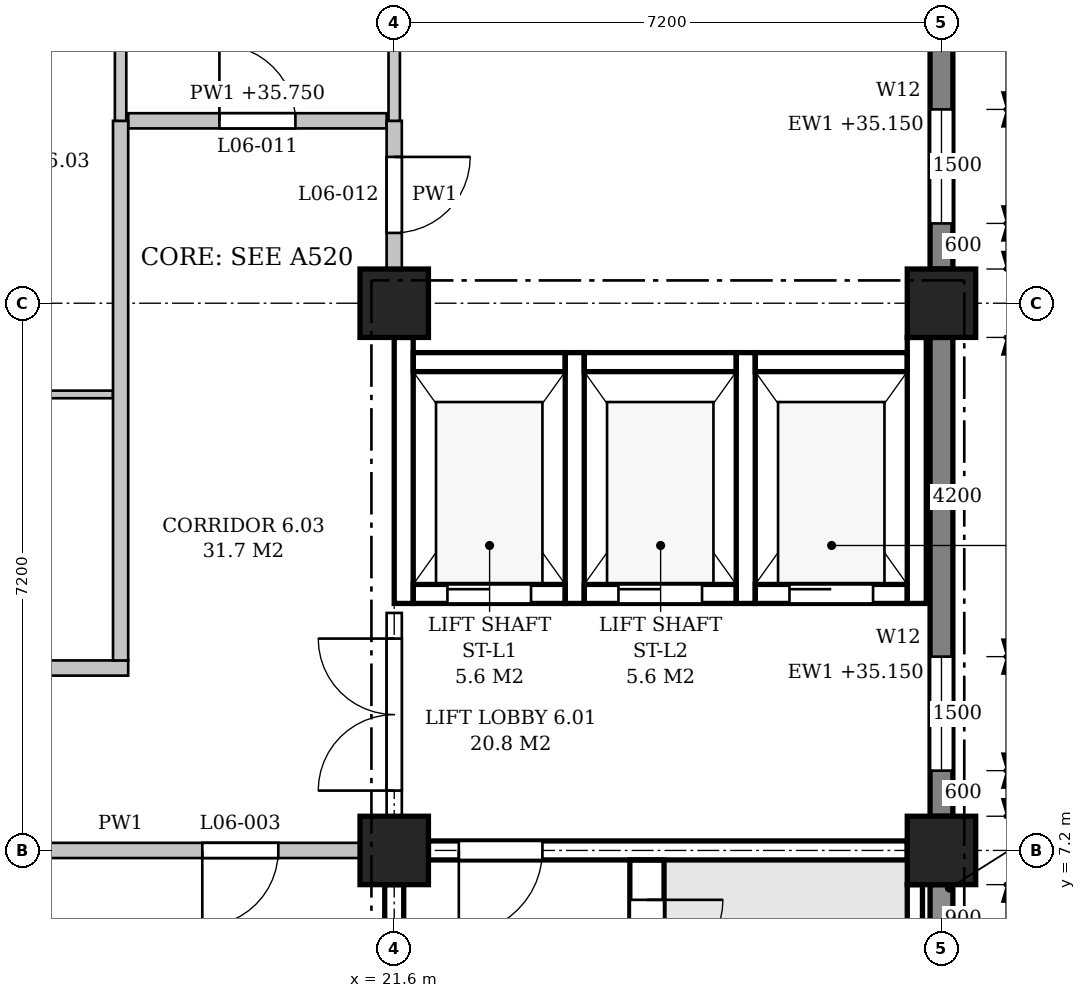
"""IFC4 building model, lengths in metres.
Left out: names, types, materials, properties, quantities, classifications, styles, units other than length and angle.
Written with IfcOpenShell. Run it as: python <this file> out.ifc"""

import sys

from ifc_helpers import new_model, si_unit, direction, frame, frame_2d, origin, origin_2d, place, context, subcontext, project, spatial, polyline, rectangle, outline, extrude, element, fill, save


model = new_model("IFC4")
c1 = context("Model", 3, precision=1e-05, world=origin(), true_north=direction((0.0, 1.0)))
c2 = subcontext(c1, "Body", "Model", "MODEL_VIEW")
j1 = project(units=[si_unit("LENGTHUNIT", "METRE"), si_unit("PLANEANGLEUNIT", "RADIAN")], contexts=[c1])
p1 = place(None, origin())
s1 = spatial("IfcSite", under=j1, at=p1, CompositionType="ELEMENT")
p2 = place(p1, origin())
s2 = spatial("IfcBuilding", under=s1, at=p2, CompositionType="ELEMENT")
p3 = place(p2, frame((0.0, 0.0, 31.2)))
s3 = spatial("IfcBuildingStorey", under=s2, at=p3, CompositionType="ELEMENT", Elevation=31.2)
for number, where, z_axis, x_axis in (
    (1, (21.6, 7.2, 0.0), (0.0, 0.0, 1.0), (1.0, 0.0, 0.0)),
    (2, (21.6, 14.4, 0.0), (0.0, 0.0, 1.0), (1.0, 0.0, 0.0)),
    (3, (28.8, 7.2, 0.0), (0.0, 0.0, 1.0), (1.0, 0.0, 0.0)),
    (4, (28.8, 14.4, 0.0), (0.0, 0.0, 1.0), (1.0, 0.0, 0.0)),
):
    element("IfcColumn", number, at=place(p3, frame(where, z_axis=z_axis, x_axis=x_axis)), inside=s3, PredefinedType="COLUMN", context=c2, shape_type="SweptSolid", body=[
        extrude(rectangle(XDim=0.9, YDim=0.9, at=origin_2d()), origin(), (0.0, 0.0, 1.0), 4.8),
    ])
p4 = place(p3, frame((28.8, 0.45, 0.0), z_axis=(0.0, 0.0, 1.0), x_axis=(0.0, 1.0, 0.0)))
e5 = element("IfcWall", 5, at=p4, inside=s3, PredefinedType="STANDARD", context=c2, shape_type="SweptSolid", body=[
    extrude(rectangle(XDim=6.3, YDim=0.3, at=frame_2d((3.15, 0.0))), origin(), (0.0, 0.0, 1.0), 3.95),
])
p5 = place(p4, frame((0.9, 0.0, 0.9)))
e6 = element("IfcOpeningElement", 6, at=p5, cuts=e5, PredefinedType="OPENING", context=c2, shape_type="SweptSolid", body=[
    extrude(outline(polyline([(0.0, 0.0), (0.9, 0.0), (0.9, 2.05), (0.45, 2.5), (0.0, 2.05), (0.0, 0.0)])), frame((0.0, 0.16, 0.0), z_axis=(0.0, -1.0, 0.0), x_axis=(1.0, 0.0, 0.0)), (0.0, 0.0, 1.0), 0.32),
])
p6 = place(p4, frame((4.5, 0.0, 0.9)))
e7 = element("IfcOpeningElement", 7, at=p6, cuts=e5, PredefinedType="OPENING", context=c2, shape_type="SweptSolid", body=[
    extrude(outline(polyline([(0.0, 0.0), (0.9, 0.0), (0.9, 2.05), (0.45, 2.5), (0.0, 2.05), (0.0, 0.0)])), frame((0.0, 0.16, 0.0), z_axis=(0.0, -1.0, 0.0), x_axis=(1.0, 0.0, 0.0)), (0.0, 0.0, 1.0), 0.32),
])
p7 = place(p3, frame((28.8, 7.65, 0.0), z_axis=(0.0, 0.0, 1.0), x_axis=(0.0, 1.0, 0.0)))
e8 = element("IfcWall", 8, at=p7, inside=s3, PredefinedType="STANDARD", context=c2, shape_type="SweptSolid", body=[
    extrude(rectangle(XDim=6.3, YDim=0.3, at=frame_2d((3.15, 0.0))), origin(), (0.0, 0.0, 1.0), 3.95),
])
p8 = place(p7, frame((0.6, 0.0, 0.9)))
e9 = element("IfcOpeningElement", 9, at=p8, cuts=e8, PredefinedType="OPENING", context=c2, shape_type="SweptSolid", body=[
    extrude(outline(polyline([(0.0, 0.0), (1.5, 0.0), (1.5, 1.75), (0.75, 2.5), (0.0, 1.75), (0.0, 0.0)])), frame((0.0, 0.16, 0.0), z_axis=(0.0, -1.0, 0.0), x_axis=(1.0, 0.0, 0.0)), (0.0, 0.0, 1.0), 0.32),
])
p9 = place(p3, frame((28.8, 14.85, 0.0), z_axis=(0.0, 0.0, 1.0), x_axis=(0.0, 1.0, 0.0)))
e10 = element("IfcWall", 10, at=p9, inside=s3, PredefinedType="STANDARD", context=c2, shape_type="SweptSolid", body=[
    extrude(rectangle(XDim=6.3, YDim=0.3, at=frame_2d((3.15, 0.0))), origin(), (0.0, 0.0, 1.0), 3.95),
])
p10 = place(p9, frame((0.6, 0.0, 0.9)))
e11 = element("IfcOpeningElement", 11, at=p10, cuts=e10, PredefinedType="OPENING", context=c2, shape_type="SweptSolid", body=[
    extrude(outline(polyline([(0.0, 0.0), (1.5, 0.0), (1.5, 1.75), (0.75, 2.5), (0.0, 1.75), (0.0, 0.0)])), frame((0.0, 0.16, 0.0), z_axis=(0.0, -1.0, 0.0), x_axis=(1.0, 0.0, 0.0)), (0.0, 0.0, 1.0), 0.32),
])
p11 = place(p9, frame((4.2, 0.0, 0.9)))
e12 = element("IfcOpeningElement", 12, at=p11, cuts=e10, PredefinedType="OPENING", context=c2, shape_type="SweptSolid", body=[
    extrude(outline(polyline([(0.0, 0.0), (1.5, 0.0), (1.5, 1.75), (0.75, 2.5), (0.0, 1.75), (0.0, 0.0)])), frame((0.0, 0.16, 0.0), z_axis=(0.0, -1.0, 0.0), x_axis=(1.0, 0.0, 0.0)), (0.0, 0.0, 1.0), 0.32),
])
p12 = place(p3, frame((22.05, 7.2, 0.0), z_axis=(0.0, 0.0, 1.0), x_axis=(1.0, 0.0, 0.0)))
e13 = element("IfcWall", 13, at=p12, inside=s3, PredefinedType="SHEAR", context=c2, shape_type="SweptSolid", body=[
    extrude(rectangle(XDim=6.3, YDim=0.25, at=frame_2d((3.15, 0.0))), origin(), (0.0, 0.0, 1.0), 3.8),
])
p13 = place(p12, frame((0.4, 0.0, 0.0)))
e14 = element("IfcOpeningElement", 14, at=p13, cuts=e13, PredefinedType="OPENING", context=c2, shape_type="SweptSolid", body=[
    extrude(rectangle(XDim=1.1, YDim=2.1, at=frame_2d((0.55, 1.05))), frame((0.0, 0.135, 0.0), z_axis=(0.0, -1.0, 0.0), x_axis=(1.0, 0.0, 0.0)), (0.0, 0.0, 1.0), 0.27),
])
p14 = place(p3, frame((21.6, 0.45, 0.0), z_axis=(0.0, 0.0, 1.0), x_axis=(0.0, 1.0, 0.0)))
e15 = element("IfcWall", 15, at=p14, inside=s3, PredefinedType="SHEAR", context=c2, shape_type="SweptSolid", body=[
    extrude(rectangle(XDim=6.3, YDim=0.25, at=frame_2d((3.15, 0.0))), origin(), (0.0, 0.0, 1.0), 3.8),
])
p15 = place(p3, frame((28.45, 5.85, -0.25), z_axis=(0.0, 0.0, 1.0), x_axis=(0.0, 1.0, 0.0)))
e16 = element("IfcWall", 16, at=p15, inside=s3, PredefinedType="SHEAR", context=c2, shape_type="SweptSolid", body=[
    extrude(rectangle(XDim=0.9, YDim=0.2, at=frame_2d((0.45, 0.0))), origin(), (0.0, 0.0, 1.0), 4.8),
])
p16 = place(p3, frame((24.925, 0.225, 0.0), z_axis=(0.0, 0.0, 1.0), x_axis=(0.0, 1.0, 0.0)))
e17 = element("IfcWall", 17, at=p16, inside=s3, PredefinedType="SHEAR", context=c2, shape_type="SweptSolid", body=[
    extrude(rectangle(XDim=6.85, YDim=0.45, at=frame_2d((3.425, 0.0))), origin(), (0.0, 0.0, 1.0), 4.55),
])
p17 = place(p16, frame((5.325, 0.0, 0.0)))
e18 = element("IfcOpeningElement", 18, at=p17, cuts=e17, PredefinedType="OPENING", context=c2, shape_type="SweptSolid", body=[
    extrude(rectangle(XDim=1.0, YDim=2.1, at=frame_2d((0.5, 1.05))), frame((0.0, 0.235, 0.0), z_axis=(0.0, -1.0, 0.0), x_axis=(1.0, 0.0, 0.0)), (0.0, 0.0, 1.0), 0.47),
])
p18 = place(p3, frame((21.725, 10.45, -0.25), z_axis=(0.0, 0.0, 1.0), x_axis=(0.0, 1.0, 0.0)))
e19 = element("IfcWall", 19, at=p18, inside=s3, PredefinedType="SHEAR", context=c2, shape_type="SweptSolid", body=[
    extrude(rectangle(XDim=3.5, YDim=0.25, at=frame_2d((1.75, 0.0))), origin(), (0.0, 0.0, 1.0), 4.05),
])
for number, where, z_axis, x_axis in (
    (20, (23.975, 10.45, -0.25), (0.0, 0.0, 1.0), (0.0, 1.0, 0.0)),
    (21, (26.225, 10.45, -0.25), (0.0, 0.0, 1.0), (0.0, 1.0, 0.0)),
):
    element("IfcWall", number, at=place(p3, frame(where, z_axis=z_axis, x_axis=x_axis)), inside=s3, PredefinedType="SHEAR", context=c2, shape_type="SweptSolid", body=[
        extrude(rectangle(XDim=3.3, YDim=0.25, at=frame_2d((1.65, 0.0))), origin(), (0.0, 0.0, 1.0), 4.8),
    ])
p19 = place(p3, frame((28.475, 10.45, -0.25), z_axis=(0.0, 0.0, 1.0), x_axis=(0.0, 1.0, 0.0)))
e22 = element("IfcWall", 22, at=p19, inside=s3, PredefinedType="SHEAR", context=c2, shape_type="SweptSolid", body=[
    extrude(rectangle(XDim=3.5, YDim=0.25, at=frame_2d((1.75, 0.0))), origin(), (0.0, 0.0, 1.0), 4.8),
])
p20 = place(p3, frame((21.85, 10.575, -0.25), z_axis=(0.0, 0.0, 1.0), x_axis=(1.0, 0.0, 0.0)))
e23 = element("IfcWall", 23, at=p20, inside=s3, PredefinedType="SHEAR", context=c2, shape_type="SweptSolid", body=[
    extrude(rectangle(XDim=2.0, YDim=0.25, at=frame_2d((1.0, 0.0))), origin(), (0.0, 0.0, 1.0), 4.8),
])
p21 = place(p20, frame((0.45, 0.0, 0.25)))
e24 = element("IfcOpeningElement", 24, at=p21, cuts=e23, PredefinedType="OPENING", context=c2, shape_type="SweptSolid", body=[
    extrude(rectangle(XDim=1.1, YDim=2.1, at=frame_2d((0.55, 1.05))), frame((0.0, 0.135, 0.0), z_axis=(0.0, -1.0, 0.0), x_axis=(1.0, 0.0, 0.0)), (0.0, 0.0, 1.0), 0.27),
])
p22 = place(p3, frame((21.85, 13.625, -0.25), z_axis=(0.0, 0.0, 1.0), x_axis=(1.0, 0.0, 0.0)))
e25 = element("IfcWall", 25, at=p22, inside=s3, PredefinedType="SHEAR", context=c2, shape_type="SweptSolid", body=[
    extrude(rectangle(XDim=2.0, YDim=0.25, at=frame_2d((1.0, 0.0))), origin(), (0.0, 0.0, 1.0), 4.8),
])
p23 = place(p3, frame((24.1, 10.575, -0.25), z_axis=(0.0, 0.0, 1.0), x_axis=(1.0, 0.0, 0.0)))
e26 = element("IfcWall", 26, at=p23, inside=s3, PredefinedType="SHEAR", context=c2, shape_type="SweptSolid", body=[
    extrude(rectangle(XDim=2.0, YDim=0.25, at=frame_2d((1.0, 0.0))), origin(), (0.0, 0.0, 1.0), 4.8),
])
p24 = place(p23, frame((0.45, 0.0, 0.25)))
e27 = element("IfcOpeningElement", 27, at=p24, cuts=e26, PredefinedType="OPENING", context=c2, shape_type="SweptSolid", body=[
    extrude(rectangle(XDim=1.1, YDim=2.1, at=frame_2d((0.55, 1.05))), frame((0.0, 0.135, 0.0), z_axis=(0.0, -1.0, 0.0), x_axis=(1.0, 0.0, 0.0)), (0.0, 0.0, 1.0), 0.27),
])
p25 = place(p3, frame((24.1, 13.625, -0.25), z_axis=(0.0, 0.0, 1.0), x_axis=(1.0, 0.0, 0.0)))
e28 = element("IfcWall", 28, at=p25, inside=s3, PredefinedType="SHEAR", context=c2, shape_type="SweptSolid", body=[
    extrude(rectangle(XDim=2.0, YDim=0.25, at=frame_2d((1.0, 0.0))), origin(), (0.0, 0.0, 1.0), 4.8),
])
p26 = place(p3, frame((26.35, 10.575, -0.25), z_axis=(0.0, 0.0, 1.0), x_axis=(1.0, 0.0, 0.0)))
e29 = element("IfcWall", 29, at=p26, inside=s3, PredefinedType="SHEAR", context=c2, shape_type="SweptSolid", body=[
    extrude(rectangle(XDim=2.0, YDim=0.25, at=frame_2d((1.0, 0.0))), origin(), (0.0, 0.0, 1.0), 4.8),
])
p27 = place(p26, frame((0.45, 0.0, 0.25)))
e30 = element("IfcOpeningElement", 30, at=p27, cuts=e29, PredefinedType="OPENING", context=c2, shape_type="SweptSolid", body=[
    extrude(rectangle(XDim=1.1, YDim=2.1, at=frame_2d((0.55, 1.05))), frame((0.0, 0.135, 0.0), z_axis=(0.0, -1.0, 0.0), x_axis=(1.0, 0.0, 0.0)), (0.0, 0.0, 1.0), 0.27),
])
p28 = place(p3, frame((26.35, 13.625, -0.25), z_axis=(0.0, 0.0, 1.0), x_axis=(1.0, 0.0, 0.0)))
e31 = element("IfcWall", 31, at=p28, inside=s3, PredefinedType="SHEAR", context=c2, shape_type="SweptSolid", body=[
    extrude(rectangle(XDim=2.0, YDim=0.25, at=frame_2d((1.0, 0.0))), origin(), (0.0, 0.0, 1.0), 4.8),
])
p29 = place(p3, frame((14.85, 7.2, 0.0), z_axis=(0.0, 0.0, 1.0), x_axis=(1.0, 0.0, 0.0)))
e32 = element("IfcWall", 32, at=p29, inside=s3, PredefinedType="PARTITIONING", context=c2, shape_type="SweptSolid", body=[
    extrude(rectangle(XDim=6.3, YDim=0.2, at=frame_2d((3.15, 0.0))), origin(), (0.0, 0.0, 1.0), 3.8),
])
p30 = place(p29, frame((4.225, 0.0, 0.0)))
e33 = element("IfcOpeningElement", 33, at=p30, cuts=e32, PredefinedType="OPENING", context=c2, shape_type="SweptSolid", body=[
    extrude(rectangle(XDim=1.0, YDim=2.1, at=frame_2d((0.5, 1.05))), frame((0.0, 0.11, 0.0), z_axis=(0.0, -1.0, 0.0), x_axis=(1.0, 0.0, 0.0)), (0.0, 0.0, 1.0), 0.22),
])
p31 = place(p3, frame((3.5, 9.6, 0.0), z_axis=(0.0, 0.0, 1.0), x_axis=(1.0, 0.0, 0.0)))
e34 = element("IfcWall", 34, at=p31, inside=s3, PredefinedType="PARTITIONING", context=c2, shape_type="SweptSolid", body=[
    extrude(outline(polyline([(0.0, 0.0), (14.6, 0.0), (14.6, 4.55), (11.15, 4.55), (11.15, 3.8), (10.65, 3.8), (10.65, 4.55), (3.95, 4.55), (3.95, 3.8), (3.45, 3.8), (3.45, 4.55), (0.0, 4.55), (0.0, 0.0)])), frame((0.0, 0.1, 0.0), z_axis=(0.0, -1.0, 0.0), x_axis=(1.0, 0.0, 0.0)), (0.0, 0.0, 1.0), 0.2),
])
p32 = place(p31, frame((1.4, 0.0, 0.0)))
e35 = element("IfcOpeningElement", 35, at=p32, cuts=e34, PredefinedType="OPENING", context=c2, shape_type="SweptSolid", body=[
    extrude(rectangle(XDim=1.0, YDim=2.1, at=frame_2d((0.5, 1.05))), frame((0.0, 0.11, 0.0), z_axis=(0.0, -1.0, 0.0), x_axis=(1.0, 0.0, 0.0)), (0.0, 0.0, 1.0), 0.22),
])
p33 = place(p31, frame((8.6, 0.0, 0.0)))
e36 = element("IfcOpeningElement", 36, at=p33, cuts=e34, PredefinedType="OPENING", context=c2, shape_type="SweptSolid", body=[
    extrude(rectangle(XDim=1.0, YDim=2.1, at=frame_2d((0.5, 1.05))), frame((0.0, 0.11, 0.0), z_axis=(0.0, -1.0, 0.0), x_axis=(1.0, 0.0, 0.0)), (0.0, 0.0, 1.0), 0.22),
])
p34 = place(p3, frame((7.3, 13.2, 0.0), z_axis=(0.0, 0.0, 1.0), x_axis=(1.0, 0.0, 0.0)))
e37 = element("IfcWall", 37, at=p34, inside=s3, PredefinedType="PARTITIONING", context=c2, shape_type="SweptSolid", body=[
    extrude(rectangle(XDim=10.6, YDim=0.1, at=frame_2d((5.3, 0.0))), origin(), (0.0, 0.0, 1.0), 3.8),
])
p35 = place(p34, frame((1.25, 0.0, 0.0)))
e38 = element("IfcOpeningElement", 38, at=p35, cuts=e37, PredefinedType="OPENING", context=c2, shape_type="SweptSolid", body=[
    extrude(rectangle(XDim=1.0, YDim=2.1, at=frame_2d((0.5, 1.05))), frame((0.0, 0.06, 0.0), z_axis=(0.0, -1.0, 0.0), x_axis=(1.0, 0.0, 0.0)), (0.0, 0.0, 1.0), 0.12),
])
p36 = place(p34, frame((4.8, 0.0, 0.0)))
e39 = element("IfcOpeningElement", 39, at=p36, cuts=e37, PredefinedType="OPENING", context=c2, shape_type="SweptSolid", body=[
    extrude(rectangle(XDim=1.0, YDim=2.1, at=frame_2d((0.5, 1.05))), frame((0.0, 0.06, 0.0), z_axis=(0.0, -1.0, 0.0), x_axis=(1.0, 0.0, 0.0)), (0.0, 0.0, 1.0), 0.12),
])
p37 = place(p34, frame((8.35, 0.0, 0.0)))
e40 = element("IfcOpeningElement", 40, at=p37, cuts=e37, PredefinedType="OPENING", context=c2, shape_type="SweptSolid", body=[
    extrude(rectangle(XDim=1.0, YDim=2.1, at=frame_2d((0.5, 1.05))), frame((0.0, 0.06, 0.0), z_axis=(0.0, -1.0, 0.0), x_axis=(1.0, 0.0, 0.0)), (0.0, 0.0, 1.0), 0.12),
])
p38 = place(p3, frame((18.1, 16.8, 0.0), z_axis=(0.0, 0.0, 1.0), x_axis=(1.0, 0.0, 0.0)))
e41 = element("IfcWall", 41, at=p38, inside=s3, PredefinedType="PARTITIONING", context=c2, shape_type="SweptSolid", body=[
    extrude(outline(polyline([(0.0, 0.0), (3.4, 0.0), (3.4, 3.8), (3.25, 3.8), (3.25, 4.55), (0.0, 4.55), (0.0, 0.0)])), frame((0.0, 0.1, 0.0), z_axis=(0.0, -1.0, 0.0), x_axis=(1.0, 0.0, 0.0)), (0.0, 0.0, 1.0), 0.2),
])
p39 = place(p38, frame((1.2, 0.0, 0.0)))
e42 = element("IfcOpeningElement", 42, at=p39, cuts=e41, PredefinedType="OPENING", context=c2, shape_type="SweptSolid", body=[
    extrude(rectangle(XDim=1.0, YDim=2.1, at=frame_2d((0.5, 1.05))), frame((0.0, 0.11, 0.0), z_axis=(0.0, -1.0, 0.0), x_axis=(1.0, 0.0, 0.0)), (0.0, 0.0, 1.0), 0.22),
])
p40 = place(p3, frame((18.0, 9.7, 0.0), z_axis=(0.0, 0.0, 1.0), x_axis=(0.0, 1.0, 0.0)))
e43 = element("IfcWall", 43, at=p40, inside=s3, PredefinedType="PARTITIONING", context=c2, shape_type="SweptSolid", body=[
    extrude(outline(polyline([(0.0, 0.0), (7.1, 0.0), (7.1, 4.55), (4.95, 4.55), (4.95, 3.8), (4.45, 3.8), (4.45, 4.55), (0.0, 4.55), (0.0, 0.0)])), frame((0.0, 0.1, 0.0), z_axis=(0.0, -1.0, 0.0), x_axis=(1.0, 0.0, 0.0)), (0.0, 0.0, 1.0), 0.2),
])
p41 = place(p3, frame((18.0, 16.8, 0.0), z_axis=(0.0, 0.0, 1.0), x_axis=(0.0, 1.0, 0.0)))
e44 = element("IfcWall", 44, at=p41, inside=s3, PredefinedType="PARTITIONING", context=c2, shape_type="SweptSolid", body=[
    extrude(rectangle(XDim=4.65, YDim=0.15, at=frame_2d((2.325, 0.0))), origin(), (0.0, 0.0, 1.0), 3.8),
])
p42 = place(p3, frame((21.6, 7.65, 0.0), z_axis=(0.0, 0.0, 1.0), x_axis=(0.0, 1.0, 0.0)))
e45 = element("IfcWall", 45, at=p42, inside=s3, PredefinedType="PARTITIONING", context=c2, shape_type="SweptSolid", body=[
    extrude(rectangle(XDim=2.675, YDim=0.2, at=frame_2d((1.337, 0.0))), origin(), (0.0, 0.0, 1.0), 3.8),
])
p43 = place(p42, frame((0.337, 0.0, 0.0)))
e46 = element("IfcOpeningElement", 46, at=p43, cuts=e45, PredefinedType="OPENING", context=c2, shape_type="SweptSolid", body=[
    extrude(rectangle(XDim=2.0, YDim=2.4, at=frame_2d((1.0, 1.2))), frame((0.0, 0.11, 0.0), z_axis=(0.0, -1.0, 0.0), x_axis=(1.0, 0.0, 0.0)), (0.0, 0.0, 1.0), 0.22),
])
p44 = place(p3, frame((21.6, 14.85, 0.0), z_axis=(0.0, 0.0, 1.0), x_axis=(0.0, 1.0, 0.0)))
e47 = element("IfcWall", 47, at=p44, inside=s3, PredefinedType="PARTITIONING", context=c2, shape_type="SweptSolid", body=[
    extrude(rectangle(XDim=1.95, YDim=0.2, at=frame_2d((0.975, 0.0))), origin(), (0.0, 0.0, 1.0), 3.8),
])
p45 = place(p44, frame((0.475, 0.0, 0.0)))
e48 = element("IfcOpeningElement", 48, at=p45, cuts=e47, PredefinedType="OPENING", context=c2, shape_type="SweptSolid", body=[
    extrude(rectangle(XDim=1.0, YDim=2.1, at=frame_2d((0.5, 1.05))), frame((0.0, 0.11, 0.0), z_axis=(0.0, -1.0, 0.0), x_axis=(1.0, 0.0, 0.0)), (0.0, 0.0, 1.0), 0.22),
])
p46 = place(p3, frame((21.6, 16.8, 0.0), z_axis=(0.0, 0.0, 1.0), x_axis=(0.0, 1.0, 0.0)))
e49 = element("IfcWall", 49, at=p46, inside=s3, PredefinedType="PARTITIONING", context=c2, shape_type="SweptSolid", body=[
    extrude(rectangle(XDim=4.35, YDim=0.15, at=frame_2d((2.175, 0.0))), origin(), (0.0, 0.0, 1.0), 3.8),
])
p47 = place(p8, origin())
e50 = element("IfcWindow", 50, at=p47, inside=s3, PartitioningType="SINGLE_PANEL", PredefinedType="WINDOW", context=c2, shape_type="SweptSolid", body=[
    extrude(outline(polyline([(0.0, 0.0), (1.5, 0.0), (1.5, 1.75), (0.75, 2.5), (0.0, 1.75), (0.0, 0.0)])), frame((0.0, 0.03, 0.0), z_axis=(0.0, -1.0, 0.0), x_axis=(1.0, 0.0, 0.0)), (0.0, 0.0, 1.0), 0.06),
])
fill(e9, e50)
p48 = place(p10, origin())
e51 = element("IfcWindow", 51, at=p48, inside=s3, PartitioningType="SINGLE_PANEL", PredefinedType="WINDOW", context=c2, shape_type="SweptSolid", body=[
    extrude(outline(polyline([(0.0, 0.0), (1.5, 0.0), (1.5, 1.75), (0.75, 2.5), (0.0, 1.75), (0.0, 0.0)])), frame((0.0, 0.03, 0.0), z_axis=(0.0, -1.0, 0.0), x_axis=(1.0, 0.0, 0.0)), (0.0, 0.0, 1.0), 0.06),
])
fill(e11, e51)
p49 = place(p17, frame((1.0, 0.0, 0.0), z_axis=(0.0, 0.0, 1.0), x_axis=(-1.0, 0.0, 0.0)))
e52 = element("IfcDoor", 52, at=p49, inside=s3, OperationType="SINGLE_SWING_LEFT", PredefinedType="DOOR", context=c2, shape_type="SweptSolid", body=[
    extrude(rectangle(XDim=1.0, YDim=2.1, at=frame_2d((0.5, 1.05))), frame((0.0, 0.025, 0.0), z_axis=(0.0, -1.0, 0.0), x_axis=(1.0, 0.0, 0.0)), (0.0, 0.0, 1.0), 0.05),
])
fill(e18, e52)
p50 = place(p13, frame((1.1, 0.0, 0.0), z_axis=(0.0, 0.0, 1.0), x_axis=(-1.0, 0.0, 0.0)))
e53 = element("IfcDoor", 53, at=p50, inside=s3, OperationType="SINGLE_SWING_RIGHT", PredefinedType="DOOR", context=c2, shape_type="SweptSolid", body=[
    extrude(rectangle(XDim=1.1, YDim=2.1, at=frame_2d((0.55, 1.05))), frame((0.0, 0.025, 0.0), z_axis=(0.0, -1.0, 0.0), x_axis=(1.0, 0.0, 0.0)), (0.0, 0.0, 1.0), 0.05),
])
fill(e14, e53)
p51 = place(p21, origin())
e54 = element("IfcDoor", 54, at=p51, inside=s3, OperationType="SLIDING_TO_LEFT", PredefinedType="DOOR", context=c2, shape_type="SweptSolid", body=[
    extrude(rectangle(XDim=1.1, YDim=2.1, at=frame_2d((0.55, 1.05))), frame((0.0, 0.025, 0.0), z_axis=(0.0, -1.0, 0.0), x_axis=(1.0, 0.0, 0.0)), (0.0, 0.0, 1.0), 0.05),
])
fill(e24, e54)
p52 = place(p24, origin())
e55 = element("IfcDoor", 55, at=p52, inside=s3, OperationType="SLIDING_TO_LEFT", PredefinedType="DOOR", context=c2, shape_type="SweptSolid", body=[
    extrude(rectangle(XDim=1.1, YDim=2.1, at=frame_2d((0.55, 1.05))), frame((0.0, 0.025, 0.0), z_axis=(0.0, -1.0, 0.0), x_axis=(1.0, 0.0, 0.0)), (0.0, 0.0, 1.0), 0.05),
])
fill(e27, e55)
p53 = place(p27, origin())
e56 = element("IfcDoor", 56, at=p53, inside=s3, OperationType="SLIDING_TO_LEFT", PredefinedType="DOOR", context=c2, shape_type="SweptSolid", body=[
    extrude(rectangle(XDim=1.1, YDim=2.1, at=frame_2d((0.55, 1.05))), frame((0.0, 0.025, 0.0), z_axis=(0.0, -1.0, 0.0), x_axis=(1.0, 0.0, 0.0)), (0.0, 0.0, 1.0), 0.05),
])
fill(e30, e56)
p54 = place(p43, origin())
e57 = element("IfcDoor", 57, at=p54, inside=s3, OperationType="DOUBLE_DOOR_SINGLE_SWING", PredefinedType="DOOR", context=c2, shape_type="SweptSolid", body=[
    extrude(rectangle(XDim=2.0, YDim=2.4, at=frame_2d((1.0, 1.2))), frame((0.0, 0.025, 0.0), z_axis=(0.0, -1.0, 0.0), x_axis=(1.0, 0.0, 0.0)), (0.0, 0.0, 1.0), 0.05),
])
fill(e46, e57)
p55 = place(p30, frame((1.0, 0.0, 0.0), z_axis=(0.0, 0.0, 1.0), x_axis=(-1.0, 0.0, 0.0)))
e58 = element("IfcDoor", 58, at=p55, inside=s3, OperationType="SINGLE_SWING_RIGHT", PredefinedType="DOOR", context=c2, shape_type="SweptSolid", body=[
    extrude(rectangle(XDim=1.0, YDim=2.1, at=frame_2d((0.5, 1.05))), frame((0.0, 0.025, 0.0), z_axis=(0.0, -1.0, 0.0), x_axis=(1.0, 0.0, 0.0)), (0.0, 0.0, 1.0), 0.05),
])
fill(e33, e58)
p56 = place(p39, origin())
e59 = element("IfcDoor", 59, at=p56, inside=s3, OperationType="SINGLE_SWING_LEFT", PredefinedType="DOOR", context=c2, shape_type="SweptSolid", body=[
    extrude(rectangle(XDim=1.0, YDim=2.1, at=frame_2d((0.5, 1.05))), frame((0.0, 0.025, 0.0), z_axis=(0.0, -1.0, 0.0), x_axis=(1.0, 0.0, 0.0)), (0.0, 0.0, 1.0), 0.05),
])
fill(e42, e59)
p57 = place(p45, frame((1.0, 0.0, 0.0), z_axis=(0.0, 0.0, 1.0), x_axis=(-1.0, 0.0, 0.0)))
e60 = element("IfcDoor", 60, at=p57, inside=s3, OperationType="SINGLE_SWING_LEFT", PredefinedType="DOOR", context=c2, shape_type="SweptSolid", body=[
    extrude(rectangle(XDim=1.0, YDim=2.1, at=frame_2d((0.5, 1.05))), frame((0.0, 0.025, 0.0), z_axis=(0.0, -1.0, 0.0), x_axis=(1.0, 0.0, 0.0)), (0.0, 0.0, 1.0), 0.05),
])
fill(e48, e60)
save(model, sys.argv[1])
